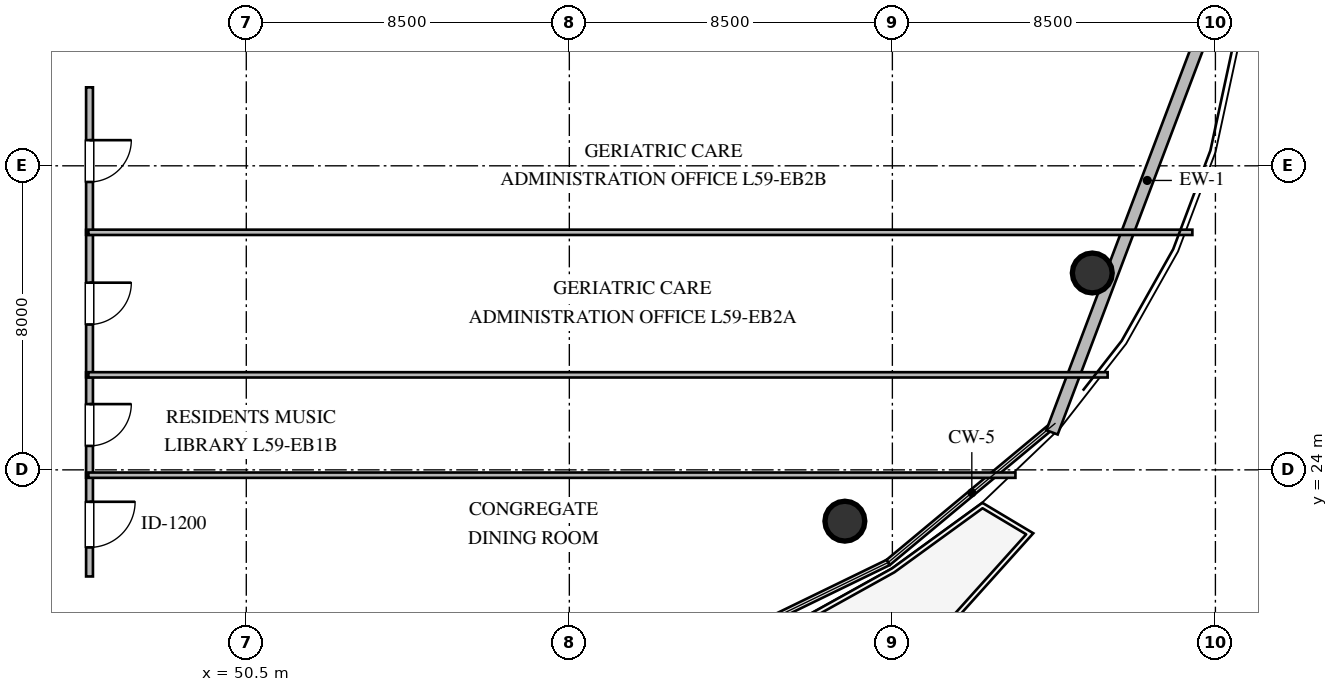
"""IFC4 building model, lengths in metres.
Left out: names, types, materials, properties, quantities, classifications, styles, units other than length and angle.
Written with IfcOpenShell. Run it as: python <this file> out.ifc"""

import sys

from ifc_helpers import new_model, si_unit, direction, frame, frame_2d, origin, origin_2d, place, context, subcontext, project, spatial, rectangle, circle, extrude, element, fill, save


model = new_model("IFC4")
c1 = context("Model", 3, precision=1e-05, world=origin(), true_north=direction((0.0, 1.0)))
c2 = subcontext(c1, "Body", "Model", "MODEL_VIEW")
j1 = project(units=[si_unit("LENGTHUNIT", "METRE"), si_unit("PLANEANGLEUNIT", "RADIAN")], contexts=[c1])
p1 = place(None, origin())
s1 = spatial("IfcSite", under=j1, at=p1, CompositionType="ELEMENT")
p2 = place(p1, origin())
s2 = spatial("IfcBuilding", under=s1, at=p2, CompositionType="ELEMENT")
p3 = place(p2, frame((0.0, 0.0, 224.4)))
s3 = spatial("IfcBuildingStorey", under=s2, at=p3, CompositionType="ELEMENT", Elevation=224.4)
for number, where, z_axis, x_axis in (
    (1, (66.25, 22.65, 0.0), (0.0, 0.0, 1.0), (1.0, 0.0, 0.0)),
    (2, (72.76, 29.18, 0.0), (0.0, 0.0, 1.0), (1.0, 0.0, 0.0)),
):
    element("IfcColumn", number, at=place(p3, frame(where, z_axis=z_axis, x_axis=x_axis)), inside=s3, PredefinedType="COLUMN", context=c2, shape_type="SweptSolid", body=[
        extrude(circle(Radius=0.525, at=origin_2d()), origin(), (0.0, 0.0, 1.0), 3.6),
    ])
p4 = place(p3, frame((76.712, 38.243, 0.0), z_axis=(0.0, 0.0, 1.0), x_axis=(-0.353659523244, -0.935374225441, 0.0)))
e3 = element("IfcWall", 3, at=p4, inside=s3, PredefinedType="STANDARD", context=c2, shape_type="SweptSolid", body=[
    extrude(rectangle(XDim=14.172, YDim=0.32, at=frame_2d((7.086, 0.0))), origin(), (0.0, 0.0, 1.0), 3.36),
])
p5 = place(p3, frame((46.375, 23.925, 0.0), z_axis=(0.0, 0.0, 1.0), x_axis=(0.0, -1.0, 0.0)))
e4 = element("IfcWall", 4, at=p5, inside=s3, PredefinedType="PARTITIONING", context=c2, shape_type="SweptSolid", body=[
    extrude(rectangle(XDim=2.73, YDim=0.18, at=frame_2d((1.365, 0.0))), origin(), (0.0, 0.0, 1.0), 3.36),
])
p6 = place(p5, frame((0.765, 0.0, 0.0)))
e5 = element("IfcOpeningElement", 5, at=p6, cuts=e4, PredefinedType="OPENING", context=c2, shape_type="SweptSolid", body=[
    extrude(rectangle(XDim=1.2, YDim=2.15, at=frame_2d((0.6, 1.075))), frame((0.0, 0.1, 0.0), z_axis=(0.0, -1.0, 0.0), x_axis=(1.0, 0.0, 0.0)), (0.0, 0.0, 1.0), 0.2),
])
p7 = place(p3, frame((46.375, 26.565, 0.0), z_axis=(0.0, 0.0, 1.0), x_axis=(0.0, -1.0, 0.0)))
e6 = element("IfcWall", 6, at=p7, inside=s3, PredefinedType="PARTITIONING", context=c2, shape_type="SweptSolid", body=[
    extrude(rectangle(XDim=2.77, YDim=0.18, at=frame_2d((1.385, 0.0))), origin(), (0.0, 0.0, 1.0), 3.36),
])
p8 = place(p7, frame((0.835, 0.0, 0.0)))
e7 = element("IfcOpeningElement", 7, at=p8, cuts=e6, PredefinedType="OPENING", context=c2, shape_type="SweptSolid", body=[
    extrude(rectangle(XDim=1.1, YDim=2.1, at=frame_2d((0.55, 1.05))), frame((0.0, 0.1, 0.0), z_axis=(0.0, -1.0, 0.0), x_axis=(1.0, 0.0, 0.0)), (0.0, 0.0, 1.0), 0.2),
])
p9 = place(p3, frame((46.375, 30.315, 0.0), z_axis=(0.0, 0.0, 1.0), x_axis=(0.0, -1.0, 0.0)))
e8 = element("IfcWall", 8, at=p9, inside=s3, PredefinedType="PARTITIONING", context=c2, shape_type="SweptSolid", body=[
    extrude(rectangle(XDim=3.88, YDim=0.18, at=frame_2d((1.94, 0.0))), origin(), (0.0, 0.0, 1.0), 3.36),
])
p10 = place(p9, frame((1.39, 0.0, 0.0)))
e9 = element("IfcOpeningElement", 9, at=p10, cuts=e8, PredefinedType="OPENING", context=c2, shape_type="SweptSolid", body=[
    extrude(rectangle(XDim=1.1, YDim=2.1, at=frame_2d((0.55, 1.05))), frame((0.0, 0.1, 0.0), z_axis=(0.0, -1.0, 0.0), x_axis=(1.0, 0.0, 0.0)), (0.0, 0.0, 1.0), 0.2),
])
p11 = place(p3, frame((46.375, 34.065, 0.0), z_axis=(0.0, 0.0, 1.0), x_axis=(0.0, -1.0, 0.0)))
e10 = element("IfcWall", 10, at=p11, inside=s3, PredefinedType="PARTITIONING", context=c2, shape_type="SweptSolid", body=[
    extrude(rectangle(XDim=3.88, YDim=0.18, at=frame_2d((1.94, 0.0))), origin(), (0.0, 0.0, 1.0), 3.36),
])
p12 = place(p11, frame((1.39, 0.0, 0.0)))
e11 = element("IfcOpeningElement", 11, at=p12, cuts=e10, PredefinedType="OPENING", context=c2, shape_type="SweptSolid", body=[
    extrude(rectangle(XDim=1.1, YDim=2.1, at=frame_2d((0.55, 1.05))), frame((0.0, 0.1, 0.0), z_axis=(0.0, -1.0, 0.0), x_axis=(1.0, 0.0, 0.0)), (0.0, 0.0, 1.0), 0.2),
])
p13 = place(p3, frame((46.345, 23.86, 0.0), z_axis=(0.0, 0.0, 1.0), x_axis=(1.0, 0.0, 0.0)))
e12 = element("IfcWall", 12, at=p13, inside=s3, PredefinedType="PARTITIONING", context=c2, shape_type="SweptSolid", body=[
    extrude(rectangle(XDim=24.393, YDim=0.14, at=frame_2d((12.197, 0.0))), origin(), (0.0, 0.0, 1.0), 2.89),
])
p14 = place(p3, frame((46.345, 26.5, 0.0), z_axis=(0.0, 0.0, 1.0), x_axis=(1.0, 0.0, 0.0)))
e13 = element("IfcWall", 13, at=p14, inside=s3, PredefinedType="PARTITIONING", context=c2, shape_type="SweptSolid", body=[
    extrude(rectangle(XDim=26.819, YDim=0.14, at=frame_2d((13.41, 0.0))), origin(), (0.0, 0.0, 1.0), 2.89),
])
p15 = place(p3, frame((46.345, 30.25, 0.0), z_axis=(0.0, 0.0, 1.0), x_axis=(1.0, 0.0, 0.0)))
e14 = element("IfcWall", 14, at=p15, inside=s3, PredefinedType="PARTITIONING", context=c2, shape_type="SweptSolid", body=[
    extrude(rectangle(XDim=29.049, YDim=0.14, at=frame_2d((14.524, 0.0))), origin(), (0.0, 0.0, 1.0), 3.36),
])
p16 = place(p6, origin())
e15 = element("IfcDoor", 15, at=p16, inside=s3, OperationType="SINGLE_SWING_LEFT", PredefinedType="DOOR", context=c2, shape_type="SweptSolid", body=[
    extrude(rectangle(XDim=1.2, YDim=2.15, at=frame_2d((0.6, 1.075))), frame((0.0, 0.025, 0.0), z_axis=(0.0, -1.0, 0.0), x_axis=(1.0, 0.0, 0.0)), (0.0, 0.0, 1.0), 0.05),
])
fill(e5, e15)
p17 = place(p8, origin())
e16 = element("IfcDoor", 16, at=p17, inside=s3, OperationType="SINGLE_SWING_LEFT", PredefinedType="DOOR", context=c2, shape_type="SweptSolid", body=[
    extrude(rectangle(XDim=1.1, YDim=2.1, at=frame_2d((0.55, 1.05))), frame((0.0, 0.025, 0.0), z_axis=(0.0, -1.0, 0.0), x_axis=(1.0, 0.0, 0.0)), (0.0, 0.0, 1.0), 0.05),
])
fill(e7, e16)
p18 = place(p10, origin())
e17 = element("IfcDoor", 17, at=p18, inside=s3, OperationType="SINGLE_SWING_LEFT", PredefinedType="DOOR", context=c2, shape_type="SweptSolid", body=[
    extrude(rectangle(XDim=1.1, YDim=2.1, at=frame_2d((0.55, 1.05))), frame((0.0, 0.025, 0.0), z_axis=(0.0, -1.0, 0.0), x_axis=(1.0, 0.0, 0.0)), (0.0, 0.0, 1.0), 0.05),
])
fill(e9, e17)
p19 = place(p12, origin())
e18 = element("IfcDoor", 18, at=p19, inside=s3, OperationType="SINGLE_SWING_LEFT", PredefinedType="DOOR", context=c2, shape_type="SweptSolid", body=[
    extrude(rectangle(XDim=1.1, YDim=2.1, at=frame_2d((0.55, 1.05))), frame((0.0, 0.025, 0.0), z_axis=(0.0, -1.0, 0.0), x_axis=(1.0, 0.0, 0.0)), (0.0, 0.0, 1.0), 0.05),
])
fill(e11, e18)
save(model, sys.argv[1])
